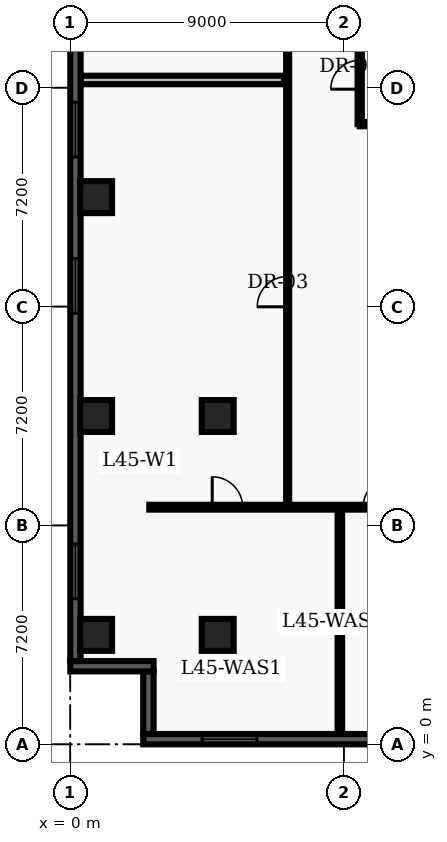
"""IFC4 building model, lengths in metres.
Left out: names, types, materials, properties, quantities, classifications, styles, units other than length and angle.
Written with IfcOpenShell. Run it as: python <this file> out.ifc"""

import sys

from ifc_helpers import new_model, entity, si_unit, converted_unit, direction, frame, origin_with_axes, origin_2d_with_axis, place, context, subcontext, project, spatial, polyline, rectangle, outline, extrude, element, fill, save


model = new_model("IFC4")
c1 = context("Model", 3, precision=1e-05, world=origin_with_axes(), true_north=direction((0.0, 1.0)))
c2 = subcontext(c1, "Body", "Model", "MODEL_VIEW")
j1 = project(units=[si_unit("LENGTHUNIT", "METRE"), converted_unit("PLANEANGLEUNIT", "DEGREE", entity("IfcPlaneAngleMeasure", 0.017), si_unit("PLANEANGLEUNIT", "RADIAN"), dimensions=[0, 0, 0, 0, 0, 0, 0])], contexts=[c1])
p1 = place(None, origin_with_axes())
s1 = spatial("IfcSite", under=j1, at=p1, CompositionType="ELEMENT")
p2 = place(p1, origin_with_axes())
s2 = spatial("IfcBuilding", under=s1, at=p2, CompositionType="ELEMENT")
p3 = place(p2, frame((0.0, 0.0, 183.6), z_axis=(0.0, 0.0, 1.0), x_axis=(1.0, 0.0, 0.0)))
s3 = spatial("IfcBuildingStorey", under=s2, at=p3, CompositionType="ELEMENT", Elevation=183.6)
for number, where, z_axis, x_axis in (
    (1, (4.85, 3.6, 0.0), (0.0, 0.0, 1.0), (1.0, 0.0, 0.0)),
    (2, (4.85, 10.8, 0.0), (0.0, 0.0, 1.0), (1.0, 0.0, 0.0)),
    (3, (0.85, 3.6, 0.0), (0.0, 0.0, 1.0), (1.0, 0.0, 0.0)),
    (4, (0.85, 10.8, 0.0), (0.0, 0.0, 1.0), (1.0, 0.0, 0.0)),
    (5, (0.85, 18.0, 0.0), (0.0, 0.0, 1.0), (1.0, 0.0, 0.0)),
):
    element("IfcColumn", number, at=place(p3, frame(where, z_axis=z_axis, x_axis=x_axis)), inside=s3, PredefinedType="COLUMN", context=c2, shape_type="SweptSolid", body=[
        extrude(rectangle(XDim=1.05, YDim=1.05, at=origin_2d_with_axis()), origin_with_axes(), (0.0, 0.0, 1.0), 3.9),
    ])
p4 = place(p3, frame((9.52, 20.4, 0.0), z_axis=(0.0, 0.0, 1.0), x_axis=(0.0, 1.0, 0.0)))
e6 = element("IfcWall", 6, at=p4, inside=s3, PredefinedType="PARTITIONING", context=c2, shape_type="SweptSolid", body=[
    extrude(outline(polyline([(0.0, -0.07), (4.0, -0.07), (4.0, 0.07), (0.0, 0.07), (0.0, -0.07)])), origin_with_axes(), (0.0, 0.0, 1.0), 2.64),
])
p5 = place(p4, frame((1.625, 0.0, 0.0), z_axis=(0.0, 0.0, 1.0), x_axis=(1.0, 0.0, 0.0)))
e7 = element("IfcOpeningElement", 7, at=p5, cuts=e6, PredefinedType="OPENING", context=c2, shape_type="SweptSolid", body=[
    extrude(rectangle(XDim=0.95, YDim=0.16, at=origin_2d_with_axis()), origin_with_axes(), (0.0, 0.0, 1.0), 2.15),
])
p6 = place(p3, frame((9.52, 20.4, 0.0), z_axis=(0.0, 0.0, 1.0), x_axis=(1.0, 0.0, 0.0)))
e8 = element("IfcWall", 8, at=p6, inside=s3, PredefinedType="PARTITIONING", context=c2, shape_type="SweptSolid", body=[
    extrude(outline(polyline([(0.0, -0.07), (1.58, -0.07), (1.58, 0.07), (0.0, 0.07), (0.0, -0.07)])), origin_with_axes(), (0.0, 0.0, 1.0), 2.64),
])
p7 = place(p3, frame((2.6, 7.8, 0.0), z_axis=(0.0, 0.0, 1.0), x_axis=(1.0, 0.0, 0.0)))
e9 = element("IfcWall", 9, at=p7, inside=s3, PredefinedType="PARTITIONING", context=c2, shape_type="SweptSolid", body=[
    extrude(outline(polyline([(0.0, -0.08), (18.55, -0.08), (18.55, 0.08), (0.0, 0.08), (0.0, -0.08)])), origin_with_axes(), (0.0, 0.0, 1.0), 2.64),
])
p8 = place(p7, frame((2.569, 0.0, 0.0), z_axis=(0.0, 0.0, 1.0), x_axis=(1.0, 0.0, 0.0)))
e10 = element("IfcOpeningElement", 10, at=p8, cuts=e9, PredefinedType="OPENING", context=c2, shape_type="SweptSolid", body=[
    extrude(rectangle(XDim=1.0, YDim=0.18, at=origin_2d_with_axis()), origin_with_axes(), (0.0, 0.0, 1.0), 2.15),
])
p9 = place(p7, frame((7.534, 0.0, 0.0), z_axis=(0.0, 0.0, 1.0), x_axis=(1.0, 0.0, 0.0)))
e11 = element("IfcOpeningElement", 11, at=p9, cuts=e9, PredefinedType="OPENING", context=c2, shape_type="SweptSolid", body=[
    extrude(rectangle(XDim=1.0, YDim=0.18, at=origin_2d_with_axis()), origin_with_axes(), (0.0, 0.0, 1.0), 2.15),
])
p10 = place(p7, frame((11.293, 0.0, 0.0), z_axis=(0.0, 0.0, 1.0), x_axis=(1.0, 0.0, 0.0)))
e12 = element("IfcOpeningElement", 12, at=p10, cuts=e9, PredefinedType="OPENING", context=c2, shape_type="SweptSolid", body=[
    extrude(rectangle(XDim=1.0, YDim=0.18, at=origin_2d_with_axis()), origin_with_axes(), (0.0, 0.0, 1.0), 2.15),
])
p11 = place(p7, frame((16.142, 0.0, 0.0), z_axis=(0.0, 0.0, 1.0), x_axis=(1.0, 0.0, 0.0)))
e13 = element("IfcOpeningElement", 13, at=p11, cuts=e9, PredefinedType="OPENING", context=c2, shape_type="SweptSolid", body=[
    extrude(rectangle(XDim=1.0, YDim=0.18, at=origin_2d_with_axis()), origin_with_axes(), (0.0, 0.0, 1.0), 2.15),
])
p12 = place(p3, frame((7.15, 7.8, 0.0), z_axis=(0.0, 0.0, 1.0), x_axis=(0.0, 1.0, 0.0)))
e14 = element("IfcWall", 14, at=p12, inside=s3, PredefinedType="PARTITIONING", context=c2, shape_type="SweptSolid", body=[
    extrude(outline(polyline([(0.0, -0.05), (32.7, -0.05), (32.7, 0.05), (0.0, 0.05), (0.0, -0.05)])), origin_with_axes(), (0.0, 0.0, 1.0), 2.64),
])
p13 = place(p12, frame((7.092, 0.0, 0.0), z_axis=(0.0, 0.0, 1.0), x_axis=(1.0, 0.0, 0.0)))
e15 = element("IfcOpeningElement", 15, at=p13, cuts=e14, PredefinedType="OPENING", context=c2, shape_type="SweptSolid", body=[
    extrude(rectangle(XDim=1.0, YDim=0.12, at=origin_2d_with_axis()), origin_with_axes(), (0.0, 0.0, 1.0), 2.15),
])
p14 = place(p12, frame((23.312, 0.0, 0.0), z_axis=(0.0, 0.0, 1.0), x_axis=(1.0, 0.0, 0.0)))
e16 = element("IfcOpeningElement", 16, at=p14, cuts=e14, PredefinedType="OPENING", context=c2, shape_type="SweptSolid", body=[
    extrude(rectangle(XDim=1.0, YDim=0.12, at=origin_2d_with_axis()), origin_with_axes(), (0.0, 0.0, 1.0), 2.15),
])
p15 = place(p3, frame((0.335, 21.854, 0.0), z_axis=(0.0, 0.0, 1.0), x_axis=(1.0, 0.0, 0.0)))
e17 = element("IfcWall", 17, at=p15, inside=s3, PredefinedType="PARTITIONING", context=c2, shape_type="SweptSolid", body=[
    extrude(outline(polyline([(0.0, -0.14), (6.695, -0.14), (6.695, 0.14), (0.0, 0.14), (0.0, -0.14)])), origin_with_axes(), (0.0, 0.0, 1.0), 2.64),
])
p16 = place(p3, frame((8.867, 0.335, 0.0), z_axis=(0.0, 0.0, 1.0), x_axis=(0.0, 1.0, 0.0)))
e18 = element("IfcWall", 18, at=p16, inside=s3, PredefinedType="PARTITIONING", context=c2, shape_type="SweptSolid", body=[
    extrude(outline(polyline([(0.0, -0.075), (7.365, -0.075), (7.365, 0.075), (0.0, 0.075), (0.0, -0.075)])), origin_with_axes(), (0.0, 0.0, 1.0), 2.64),
])
p17 = place(p3, frame((57.26, 0.17, 0.0), z_axis=(0.0, 0.0, 1.0), x_axis=(-1.0, 0.0, 0.0)))
e19 = element("IfcWall", 19, at=p17, inside=s3, PredefinedType="SOLIDWALL", context=c2, shape_type="SweptSolid", body=[
    extrude(outline(polyline([(0.0, -0.17), (54.86, -0.17), (54.86, 0.17), (0.0, 0.17), (0.0, -0.17)])), origin_with_axes(), (0.0, 0.0, 1.0), 3.6),
])
p18 = place(p17, frame((2.836, 0.0, 0.45), z_axis=(0.0, 0.0, 1.0), x_axis=(1.0, 0.0, 0.0)))
e20 = element("IfcOpeningElement", 20, at=p18, cuts=e19, PredefinedType="OPENING", context=c2, shape_type="SweptSolid", body=[
    extrude(rectangle(XDim=1.8, YDim=0.36, at=origin_2d_with_axis()), origin_with_axes(), (0.0, 0.0, 1.0), 2.1),
])
p19 = place(p17, frame((7.307, 0.0, 0.45), z_axis=(0.0, 0.0, 1.0), x_axis=(1.0, 0.0, 0.0)))
e21 = element("IfcOpeningElement", 21, at=p19, cuts=e19, PredefinedType="OPENING", context=c2, shape_type="SweptSolid", body=[
    extrude(rectangle(XDim=1.8, YDim=0.36, at=origin_2d_with_axis()), origin_with_axes(), (0.0, 0.0, 1.0), 2.1),
])
p20 = place(p17, frame((11.779, 0.0, 0.45), z_axis=(0.0, 0.0, 1.0), x_axis=(1.0, 0.0, 0.0)))
e22 = element("IfcOpeningElement", 22, at=p20, cuts=e19, PredefinedType="OPENING", context=c2, shape_type="SweptSolid", body=[
    extrude(rectangle(XDim=1.8, YDim=0.36, at=origin_2d_with_axis()), origin_with_axes(), (0.0, 0.0, 1.0), 2.1),
])
p21 = place(p17, frame((16.251, 0.0, 0.45), z_axis=(0.0, 0.0, 1.0), x_axis=(1.0, 0.0, 0.0)))
e23 = element("IfcOpeningElement", 23, at=p21, cuts=e19, PredefinedType="OPENING", context=c2, shape_type="SweptSolid", body=[
    extrude(rectangle(XDim=1.8, YDim=0.36, at=origin_2d_with_axis()), origin_with_axes(), (0.0, 0.0, 1.0), 2.1),
])
p22 = place(p17, frame((20.723, 0.0, 0.45), z_axis=(0.0, 0.0, 1.0), x_axis=(1.0, 0.0, 0.0)))
e24 = element("IfcOpeningElement", 24, at=p22, cuts=e19, PredefinedType="OPENING", context=c2, shape_type="SweptSolid", body=[
    extrude(rectangle(XDim=1.8, YDim=0.36, at=origin_2d_with_axis()), origin_with_axes(), (0.0, 0.0, 1.0), 2.1),
])
p23 = place(p17, frame((25.644, 0.0, 0.45), z_axis=(0.0, 0.0, 1.0), x_axis=(1.0, 0.0, 0.0)))
e25 = element("IfcOpeningElement", 25, at=p23, cuts=e19, PredefinedType="OPENING", context=c2, shape_type="SweptSolid", body=[
    extrude(rectangle(XDim=1.8, YDim=0.36, at=origin_2d_with_axis()), origin_with_axes(), (0.0, 0.0, 1.0), 2.1),
])
p24 = place(p17, frame((34.138, 0.0, 0.45), z_axis=(0.0, 0.0, 1.0), x_axis=(1.0, 0.0, 0.0)))
e26 = element("IfcOpeningElement", 26, at=p24, cuts=e19, PredefinedType="OPENING", context=c2, shape_type="SweptSolid", body=[
    extrude(rectangle(XDim=1.8, YDim=0.36, at=origin_2d_with_axis()), origin_with_axes(), (0.0, 0.0, 1.0), 2.1),
])
p25 = place(p17, frame((38.609, 0.0, 0.45), z_axis=(0.0, 0.0, 1.0), x_axis=(1.0, 0.0, 0.0)))
e27 = element("IfcOpeningElement", 27, at=p25, cuts=e19, PredefinedType="OPENING", context=c2, shape_type="SweptSolid", body=[
    extrude(rectangle(XDim=1.8, YDim=0.36, at=origin_2d_with_axis()), origin_with_axes(), (0.0, 0.0, 1.0), 2.1),
])
p26 = place(p17, frame((43.081, 0.0, 0.45), z_axis=(0.0, 0.0, 1.0), x_axis=(1.0, 0.0, 0.0)))
e28 = element("IfcOpeningElement", 28, at=p26, cuts=e19, PredefinedType="OPENING", context=c2, shape_type="SweptSolid", body=[
    extrude(rectangle(XDim=1.8, YDim=0.36, at=origin_2d_with_axis()), origin_with_axes(), (0.0, 0.0, 1.0), 2.1),
])
p27 = place(p17, frame((52.024, 0.0, 0.45), z_axis=(0.0, 0.0, 1.0), x_axis=(1.0, 0.0, 0.0)))
e29 = element("IfcOpeningElement", 29, at=p27, cuts=e19, PredefinedType="OPENING", context=c2, shape_type="SweptSolid", body=[
    extrude(rectangle(XDim=1.8, YDim=0.36, at=origin_2d_with_axis()), origin_with_axes(), (0.0, 0.0, 1.0), 2.1),
])
p28 = place(p3, frame((2.57, 0.34, 0.0), z_axis=(0.0, 0.0, 1.0), x_axis=(0.0, 1.0, 0.0)))
e30 = element("IfcWall", 30, at=p28, inside=s3, PredefinedType="SOLIDWALL", context=c2, shape_type="SweptSolid", body=[
    extrude(outline(polyline([(0.0, -0.17), (2.06, -0.17), (2.06, 0.17), (0.0, 0.17), (0.0, -0.17)])), origin_with_axes(), (0.0, 0.0, 1.0), 3.6),
])
p29 = place(p3, frame((2.74, 2.57, 0.0), z_axis=(0.0, 0.0, 1.0), x_axis=(-1.0, 0.0, 0.0)))
e31 = element("IfcWall", 31, at=p29, inside=s3, PredefinedType="SOLIDWALL", context=c2, shape_type="SweptSolid", body=[
    extrude(outline(polyline([(0.0, -0.17), (2.74, -0.17), (2.74, 0.17), (0.0, 0.17), (0.0, -0.17)])), origin_with_axes(), (0.0, 0.0, 1.0), 3.6),
])
p30 = place(p3, frame((0.17, 2.74, 0.0), z_axis=(0.0, 0.0, 1.0), x_axis=(0.0, 1.0, 0.0)))
e32 = element("IfcWall", 32, at=p30, inside=s3, PredefinedType="SOLIDWALL", context=c2, shape_type="SweptSolid", body=[
    extrude(outline(polyline([(0.0, -0.17), (43.46, -0.17), (43.46, 0.17), (0.0, 0.17), (0.0, -0.17)])), origin_with_axes(), (0.0, 0.0, 1.0), 3.6),
])
p31 = place(p30, frame((2.948, 0.0, 0.45), z_axis=(0.0, 0.0, 1.0), x_axis=(1.0, 0.0, 0.0)))
e33 = element("IfcOpeningElement", 33, at=p31, cuts=e32, PredefinedType="OPENING", context=c2, shape_type="SweptSolid", body=[
    extrude(rectangle(XDim=1.8, YDim=0.36, at=origin_2d_with_axis()), origin_with_axes(), (0.0, 0.0, 1.0), 2.1),
])
p32 = place(p30, frame((12.339, 0.0, 0.45), z_axis=(0.0, 0.0, 1.0), x_axis=(1.0, 0.0, 0.0)))
e34 = element("IfcOpeningElement", 34, at=p32, cuts=e32, PredefinedType="OPENING", context=c2, shape_type="SweptSolid", body=[
    extrude(rectangle(XDim=1.8, YDim=0.36, at=origin_2d_with_axis()), origin_with_axes(), (0.0, 0.0, 1.0), 2.1),
])
p33 = place(p30, frame((17.484, 0.0, 0.45), z_axis=(0.0, 0.0, 1.0), x_axis=(1.0, 0.0, 0.0)))
e35 = element("IfcOpeningElement", 35, at=p33, cuts=e32, PredefinedType="OPENING", context=c2, shape_type="SweptSolid", body=[
    extrude(rectangle(XDim=1.8, YDim=0.36, at=origin_2d_with_axis()), origin_with_axes(), (0.0, 0.0, 1.0), 2.1),
])
p34 = place(p30, frame((21.73, 0.0, 0.45), z_axis=(0.0, 0.0, 1.0), x_axis=(1.0, 0.0, 0.0)))
e36 = element("IfcOpeningElement", 36, at=p34, cuts=e32, PredefinedType="OPENING", context=c2, shape_type="SweptSolid", body=[
    extrude(rectangle(XDim=1.8, YDim=0.36, at=origin_2d_with_axis()), origin_with_axes(), (0.0, 0.0, 1.0), 2.1),
])
p35 = place(p30, frame((26.426, 0.0, 0.45), z_axis=(0.0, 0.0, 1.0), x_axis=(1.0, 0.0, 0.0)))
e37 = element("IfcOpeningElement", 37, at=p35, cuts=e32, PredefinedType="OPENING", context=c2, shape_type="SweptSolid", body=[
    extrude(rectangle(XDim=1.8, YDim=0.36, at=origin_2d_with_axis()), origin_with_axes(), (0.0, 0.0, 1.0), 2.1),
])
p36 = place(p30, frame((31.121, 0.0, 0.45), z_axis=(0.0, 0.0, 1.0), x_axis=(1.0, 0.0, 0.0)))
e38 = element("IfcOpeningElement", 38, at=p36, cuts=e32, PredefinedType="OPENING", context=c2, shape_type="SweptSolid", body=[
    extrude(rectangle(XDim=1.8, YDim=0.36, at=origin_2d_with_axis()), origin_with_axes(), (0.0, 0.0, 1.0), 2.1),
])
p37 = place(p30, frame((40.062, 0.0, 0.45), z_axis=(0.0, 0.0, 1.0), x_axis=(1.0, 0.0, 0.0)))
e39 = element("IfcOpeningElement", 39, at=p37, cuts=e32, PredefinedType="OPENING", context=c2, shape_type="SweptSolid", body=[
    extrude(rectangle(XDim=1.8, YDim=0.36, at=origin_2d_with_axis()), origin_with_axes(), (0.0, 0.0, 1.0), 2.1),
])
p38 = place(p4, frame((1.625, 0.0, 0.0), z_axis=(0.0, 0.0, 1.0), x_axis=(1.0, 0.0, 0.0)))
e40 = element("IfcDoor", 40, at=p38, inside=s3, OperationType="SINGLE_SWING_LEFT", PredefinedType="DOOR", context=c2, shape_type="SweptSolid", body=[
    extrude(rectangle(XDim=0.95, YDim=0.084, at=origin_2d_with_axis()), origin_with_axes(), (0.0, 0.0, 1.0), 2.15),
])
fill(e7, e40)
p39 = place(p12, frame((7.092, 0.0, 0.0), z_axis=(0.0, 0.0, 1.0), x_axis=(1.0, 0.0, 0.0)))
e41 = element("IfcDoor", 41, at=p39, inside=s3, OperationType="SINGLE_SWING_LEFT", PredefinedType="DOOR", context=c2, shape_type="SweptSolid", body=[
    extrude(rectangle(XDim=1.0, YDim=0.06, at=origin_2d_with_axis()), origin_with_axes(), (0.0, 0.0, 1.0), 2.15),
])
fill(e15, e41)
p40 = place(p7, frame((2.569, 0.0, 0.0), z_axis=(0.0, 0.0, 1.0), x_axis=(1.0, 0.0, 0.0)))
e42 = element("IfcDoor", 42, at=p40, inside=s3, OperationType="SINGLE_SWING_LEFT", PredefinedType="DOOR", context=c2, shape_type="SweptSolid", body=[
    extrude(rectangle(XDim=1.0, YDim=0.09, at=origin_2d_with_axis()), origin_with_axes(), (0.0, 0.0, 1.0), 2.15),
])
fill(e10, e42)
p41 = place(p7, frame((7.534, 0.0, 0.0), z_axis=(0.0, 0.0, 1.0), x_axis=(1.0, 0.0, 0.0)))
e43 = element("IfcDoor", 43, at=p41, inside=s3, OperationType="SINGLE_SWING_RIGHT", PredefinedType="DOOR", context=c2, shape_type="SweptSolid", body=[
    extrude(rectangle(XDim=1.0, YDim=0.09, at=origin_2d_with_axis()), origin_with_axes(), (0.0, 0.0, 1.0), 2.15),
])
fill(e11, e43)
p42 = place(p17, frame((52.024, 0.0, 0.45), z_axis=(0.0, 0.0, 1.0), x_axis=(1.0, 0.0, 0.0)))
e44 = element("IfcWindow", 44, at=p42, inside=s3, PredefinedType="WINDOW", context=c2, shape_type="SweptSolid", body=[
    extrude(rectangle(XDim=1.8, YDim=0.09, at=origin_2d_with_axis()), origin_with_axes(), (0.0, 0.0, 1.0), 2.1),
])
fill(e29, e44)
p43 = place(p30, frame((2.948, 0.0, 0.45), z_axis=(0.0, 0.0, 1.0), x_axis=(1.0, 0.0, 0.0)))
e45 = element("IfcWindow", 45, at=p43, inside=s3, PredefinedType="WINDOW", context=c2, shape_type="SweptSolid", body=[
    extrude(rectangle(XDim=1.8, YDim=0.09, at=origin_2d_with_axis()), origin_with_axes(), (0.0, 0.0, 1.0), 2.1),
])
fill(e33, e45)
p44 = place(p30, frame((12.339, 0.0, 0.45), z_axis=(0.0, 0.0, 1.0), x_axis=(1.0, 0.0, 0.0)))
e46 = element("IfcWindow", 46, at=p44, inside=s3, PredefinedType="WINDOW", context=c2, shape_type="SweptSolid", body=[
    extrude(rectangle(XDim=1.8, YDim=0.09, at=origin_2d_with_axis()), origin_with_axes(), (0.0, 0.0, 1.0), 2.1),
])
fill(e34, e46)
p45 = place(p30, frame((17.484, 0.0, 0.45), z_axis=(0.0, 0.0, 1.0), x_axis=(1.0, 0.0, 0.0)))
e47 = element("IfcWindow", 47, at=p45, inside=s3, PredefinedType="WINDOW", context=c2, shape_type="SweptSolid", body=[
    extrude(rectangle(XDim=1.8, YDim=0.09, at=origin_2d_with_axis()), origin_with_axes(), (0.0, 0.0, 1.0), 2.1),
])
fill(e35, e47)
save(model, sys.argv[1])
